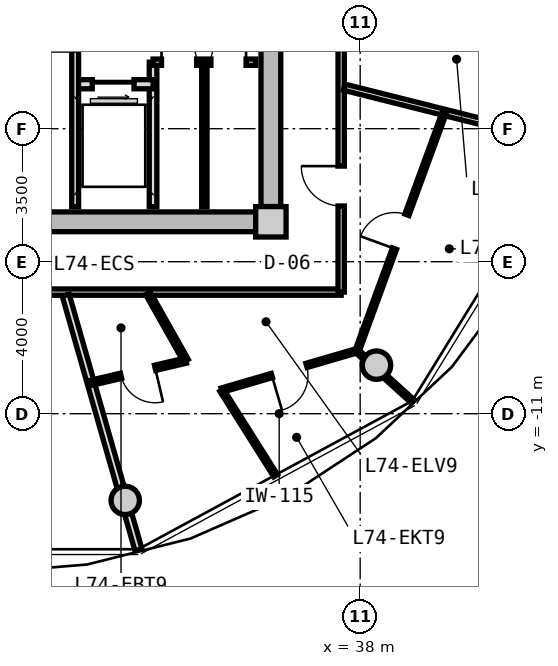
"""IFC4 building model, lengths in metres.
Left out: names, types, materials, properties, quantities, classifications, styles, units other than length and angle.
Written with IfcOpenShell. Run it as: python <this file> out.ifc"""

import sys

from ifc_helpers import new_model, si_unit, direction, frame, frame_2d, origin, origin_2d, place, context, subcontext, project, spatial, rectangle, circle, extrude, source, transform, mapped, element, fill, save


model = new_model("IFC4")
c1 = context("Model", 3, precision=1e-05, world=origin(), true_north=direction((0.0, 1.0)))
c2 = subcontext(c1, "Body", "Model", "MODEL_VIEW")
j1 = project(units=[si_unit("LENGTHUNIT", "METRE"), si_unit("PLANEANGLEUNIT", "RADIAN")], contexts=[c1])
p1 = place(None, origin())
s1 = spatial("IfcSite", under=j1, at=p1, CompositionType="ELEMENT")
p2 = place(p1, origin())
s2 = spatial("IfcBuilding", under=s1, at=p2, CompositionType="ELEMENT")
p3 = place(p2, frame((0.0, 0.0, 238.3)))
s3 = spatial("IfcBuildingStorey", under=s2, at=p3, CompositionType="ELEMENT", Elevation=238.3)
m1 = source(origin(), c2, "Body", "SweptSolid", [
    extrude(rectangle(XDim=0.8, YDim=0.8, at=origin_2d()), origin(), (0.0, 0.0, 1.0), 3.05),
])
p4 = place(p3, frame((35.65, -5.95, 0.0), z_axis=(0.0, 0.0, 1.0), x_axis=(1.0, 0.0, 0.0)))
e1 = element("IfcColumn", 1, at=p4, inside=s3, PredefinedType="COLUMN", context=c2, shape_type="MappedRepresentation", body=[
    mapped(m1, transform((0.0, 0.0, 0.0), x_axis=(1.0, 0.0, 0.0), y_axis=(0.0, 1.0, 0.0), z_axis=(0.0, 0.0, 1.0), scale=1.0)),
])
m2 = source(origin(), c2, "Body", "SweptSolid", [
    extrude(rectangle(XDim=14.5, YDim=0.52, at=frame_2d((7.25, 0.0))), origin(), (0.0, 0.0, 1.0), 2.81),
])
p5 = place(p3, frame((35.25, -5.95, 0.0), z_axis=(0.0, 0.0, 1.0), x_axis=(-1.0, 0.0, 0.0)))
e2 = element("IfcWall", 2, at=p5, inside=s3, PredefinedType="SHEAR", context=c2, shape_type="MappedRepresentation", body=[
    mapped(m2, transform((0.0, 0.0, 0.0), x_axis=(1.0, 0.0, 0.0), y_axis=(0.0, 1.0, 0.0), z_axis=(0.0, 0.0, 1.0), scale=1.0)),
])
m3 = source(origin(), c2, "Body", "SweptSolid", [
    extrude(rectangle(XDim=11.1, YDim=0.52, at=frame_2d((5.55, 0.0))), origin(), (0.0, 0.0, 1.0), 2.81),
])
p6 = place(p3, frame((35.65, 5.55, 0.0), z_axis=(0.0, 0.0, 1.0), x_axis=(0.0, -1.0, 0.0)))
e3 = element("IfcWall", 3, at=p6, inside=s3, PredefinedType="SHEAR", context=c2, shape_type="MappedRepresentation", body=[
    mapped(m3, transform((0.0, 0.0, 0.0), x_axis=(1.0, 0.0, 0.0), y_axis=(0.0, 1.0, 0.0), z_axis=(0.0, 0.0, 1.0), scale=1.0)),
])
p7 = place(p6, frame((5.65, 0.0, 0.0)))
e4 = element("IfcOpeningElement", 4, at=p7, cuts=e3, PredefinedType="OPENING", context=c2, shape_type="SweptSolid", body=[
    extrude(rectangle(XDim=1.2, YDim=2.15, at=frame_2d((0.6, 1.075))), frame((0.0, 0.27, 0.0), z_axis=(0.0, -1.0, 0.0), x_axis=(1.0, 0.0, 0.0)), (0.0, 0.0, 1.0), 0.54),
])
m4 = source(origin(), c2, "Body", "SweptSolid", [
    extrude(circle(Radius=0.375, at=origin_2d()), origin(), (0.0, 0.0, 1.0), 3.05),
])
for number, where, z_axis, x_axis in (
    (5, (31.818, -13.281, 0.0), (0.0, 0.0, 1.0), (1.0, 0.0, 0.0)),
    (6, (38.43, -9.723, 0.0), (0.0, 0.0, 1.0), (1.0, 0.0, 0.0)),
):
    element("IfcColumn", number, at=place(p3, frame(where, z_axis=z_axis, x_axis=x_axis)), inside=s3, PredefinedType="COLUMN", context=c2, shape_type="MappedRepresentation", body=[
        mapped(m4, transform((0.0, 0.0, 0.0), x_axis=(1.0, 0.0, 0.0), y_axis=(0.0, 1.0, 0.0), z_axis=(0.0, 0.0, 1.0), scale=1.0)),
    ])
m5 = source(origin(), c2, "Body", "SweptSolid", [
    extrude(rectangle(XDim=3.8, YDim=0.2, at=frame_2d((1.9, 0.0))), origin(), (0.0, 0.0, 1.0), 2.795),
])
p8 = place(p3, frame((32.55, -5.55, 0.0), z_axis=(0.0, 0.0, 1.0), x_axis=(0.0, 1.0, 0.0)))
e7 = element("IfcWall", 7, at=p8, inside=s3, PredefinedType="PARTITIONING", context=c2, shape_type="MappedRepresentation", body=[
    mapped(m5, transform((0.0, 0.0, 0.0), x_axis=(1.0, 0.0, 0.0), y_axis=(0.0, 1.0, 0.0), z_axis=(0.0, 0.0, 1.0), scale=1.0)),
])
m6 = source(origin(), c2, "Body", "SweptSolid", [
    extrude(rectangle(XDim=2.05, YDim=0.24, at=frame_2d((1.025, 0.0))), origin(), (0.0, 0.0, 1.0), 2.795),
])
p9 = place(p3, frame((30.5, -2.33, 0.0), z_axis=(0.0, 0.0, 1.0), x_axis=(1.0, 0.0, 0.0)))
e8 = element("IfcWall", 8, at=p9, inside=s3, PredefinedType="PARTITIONING", context=c2, shape_type="MappedRepresentation", body=[
    mapped(m6, transform((0.0, 0.0, 0.0), x_axis=(1.0, 0.0, 0.0), y_axis=(0.0, 1.0, 0.0), z_axis=(0.0, 0.0, 1.0), scale=1.0)),
])
p10 = place(p9, frame((0.45, 0.0, 0.0)))
e9 = element("IfcOpeningElement", 9, at=p10, cuts=e8, PredefinedType="OPENING", context=c2, shape_type="SweptSolid", body=[
    extrude(rectangle(XDim=1.1, YDim=2.2, at=frame_2d((0.55, 1.1))), frame((0.0, 0.13, 0.0), z_axis=(0.0, -1.0, 0.0), x_axis=(1.0, 0.0, 0.0)), (0.0, 0.0, 1.0), 0.26),
])
m7 = source(origin(), c2, "Body", "SweptSolid", [
    extrude(rectangle(XDim=4.2, YDim=0.18, at=frame_2d((2.1, 0.0))), origin(), (0.0, 0.0, 1.0), 2.795),
])
p11 = place(p3, frame((30.5, -5.55, 0.0), z_axis=(0.0, 0.0, 1.0), x_axis=(0.0, 1.0, 0.0)))
e10 = element("IfcWall", 10, at=p11, inside=s3, PredefinedType="PARTITIONING", context=c2, shape_type="MappedRepresentation", body=[
    mapped(m7, transform((0.0, 0.0, 0.0), x_axis=(1.0, 0.0, 0.0), y_axis=(0.0, 1.0, 0.0), z_axis=(0.0, 0.0, 1.0), scale=1.0)),
])
m8 = source(origin(), c2, "Body", "SweptSolid", [
    extrude(rectangle(XDim=2.7, YDim=0.165, at=frame_2d((1.35, 0.0))), origin(), (0.0, 0.0, 1.0), 2.795),
])
p12 = place(p3, frame((32.55, -1.75, 0.0), z_axis=(0.0, 0.0, 1.0), x_axis=(1.0, 0.0, 0.0)))
e11 = element("IfcWall", 11, at=p12, inside=s3, PredefinedType="PARTITIONING", context=c2, shape_type="MappedRepresentation", body=[
    mapped(m8, transform((0.0, 0.0, 0.0), x_axis=(1.0, 0.0, 0.0), y_axis=(0.0, 1.0, 0.0), z_axis=(0.0, 0.0, 1.0), scale=1.0)),
])
p13 = place(p12, frame((0.222, 0.0, 0.0)))
e12 = element("IfcOpeningElement", 12, at=p13, cuts=e11, PredefinedType="OPENING", context=c2, shape_type="SweptSolid", body=[
    extrude(rectangle(XDim=0.925, YDim=2.1, at=frame_2d((0.462, 1.05))), frame((0.0, 0.093, 0.0), z_axis=(0.0, -1.0, 0.0), x_axis=(1.0, 0.0, 0.0)), (0.0, 0.0, 1.0), 0.185),
])
p14 = place(p12, frame((1.522, 0.0, 0.0)))
e13 = element("IfcOpeningElement", 13, at=p14, cuts=e11, PredefinedType="OPENING", context=c2, shape_type="SweptSolid", body=[
    extrude(rectangle(XDim=0.925, YDim=2.1, at=frame_2d((0.462, 1.05))), frame((0.0, 0.093, 0.0), z_axis=(0.0, -1.0, 0.0), x_axis=(1.0, 0.0, 0.0)), (0.0, 0.0, 1.0), 0.185),
])
m9 = source(origin(), c2, "Body", "SweptSolid", [
    extrude(rectangle(XDim=3.8, YDim=0.14, at=frame_2d((1.9, 0.0))), origin(), (0.0, 0.0, 1.0), 2.795),
])
p15 = place(p3, frame((33.9, -5.55, 0.0), z_axis=(0.0, 0.0, 1.0), x_axis=(0.0, 1.0, 0.0)))
e14 = element("IfcWall", 14, at=p15, inside=s3, PredefinedType="PARTITIONING", context=c2, shape_type="MappedRepresentation", body=[
    mapped(m9, transform((0.0, 0.0, 0.0), x_axis=(1.0, 0.0, 0.0), y_axis=(0.0, 1.0, 0.0), z_axis=(0.0, 0.0, 1.0), scale=1.0)),
])
m10 = source(origin(), c2, "Body", "SweptSolid", [
    extrude(rectangle(XDim=19.0, YDim=0.165, at=frame_2d((9.5, 0.0))), origin(), (0.0, 0.0, 1.0), 2.795),
])
p16 = place(p3, frame((37.5, -7.8, 0.0), z_axis=(0.0, 0.0, 1.0), x_axis=(-1.0, 0.0, 0.0)))
e15 = element("IfcWall", 15, at=p16, inside=s3, PredefinedType="PARTITIONING", context=c2, shape_type="MappedRepresentation", body=[
    mapped(m10, transform((0.0, 0.0, 0.0), x_axis=(1.0, 0.0, 0.0), y_axis=(0.0, 1.0, 0.0), z_axis=(0.0, 0.0, 1.0), scale=1.0)),
])
p17 = place(p16, frame((12.373, 0.0, 0.0)))
e16 = element("IfcOpeningElement", 16, at=p17, cuts=e15, PredefinedType="OPENING", context=c2, shape_type="SweptSolid", body=[
    extrude(rectangle(XDim=1.25, YDim=2.2, at=frame_2d((0.625, 1.1))), frame((0.0, 0.093, 0.0), z_axis=(0.0, -1.0, 0.0), x_axis=(1.0, 0.0, 0.0)), (0.0, 0.0, 1.0), 0.185),
])
m11 = source(origin(), c2, "Body", "SweptSolid", [
    extrude(rectangle(XDim=6.88, YDim=0.165, at=frame_2d((3.44, 0.0))), origin(), (0.0, 0.0, 1.0), 2.795),
])
p18 = place(p3, frame((37.5, -0.92, 0.0), z_axis=(0.0, 0.0, 1.0), x_axis=(0.0, -1.0, 0.0)))
e17 = element("IfcWall", 17, at=p18, inside=s3, PredefinedType="PARTITIONING", context=c2, shape_type="MappedRepresentation", body=[
    mapped(m11, transform((0.0, 0.0, 0.0), x_axis=(1.0, 0.0, 0.0), y_axis=(0.0, 1.0, 0.0), z_axis=(0.0, 0.0, 1.0), scale=1.0)),
])
p19 = place(p18, frame((3.564, 0.0, 0.0)))
e18 = element("IfcOpeningElement", 18, at=p19, cuts=e17, PredefinedType="OPENING", context=c2, shape_type="SweptSolid", body=[
    extrude(rectangle(XDim=1.05, YDim=2.15, at=frame_2d((0.525, 1.075))), frame((0.0, 0.093, 0.0), z_axis=(0.0, -1.0, 0.0), x_axis=(1.0, 0.0, 0.0)), (0.0, 0.0, 1.0), 0.185),
])
m12 = source(origin(), c2, "Body", "SweptSolid", [
    extrude(rectangle(XDim=6.157, YDim=0.165, at=frame_2d((3.079, 0.0))), origin(), (0.0, 0.0, 1.0), 2.395),
])
p20 = place(p3, frame((37.58, -2.407, 0.0), z_axis=(0.0, 0.0, 1.0), x_axis=(0.969840867184, -0.243738984038, 0.0)))
e19 = element("IfcWall", 19, at=p20, inside=s3, PredefinedType="PARTITIONING", context=c2, shape_type="MappedRepresentation", body=[
    mapped(m12, transform((0.0, 0.0, 0.0), x_axis=(1.0, 0.0, 0.0), y_axis=(0.0, 1.0, 0.0), z_axis=(0.0, 0.0, 1.0), scale=1.0)),
])
m13 = source(origin(), c2, "Body", "SweptSolid", [
    extrude(rectangle(XDim=6.974, YDim=0.19, at=frame_2d((3.487, 0.0))), origin(), (0.0, 0.0, 1.0), 2.395),
])
p21 = place(p3, frame((30.251, -7.88, 0.0), z_axis=(0.0, 0.0, 1.0), x_axis=(0.274707256801, -0.961527910703, 0.0)))
e20 = element("IfcWall", 20, at=p21, inside=s3, PredefinedType="PARTITIONING", context=c2, shape_type="MappedRepresentation", body=[
    mapped(m13, transform((0.0, 0.0, 0.0), x_axis=(1.0, 0.0, 0.0), y_axis=(0.0, 1.0, 0.0), z_axis=(0.0, 0.0, 1.0), scale=1.0)),
])
m14 = source(origin(), c2, "Body", "SweptSolid", [
    extrude(rectangle(XDim=6.69, YDim=0.115, at=frame_2d((3.345, 0.0))), origin(), (0.0, 0.0, 1.0), 2.795),
])
p22 = place(p3, frame((37.917, -9.352, 0.0), z_axis=(0.0, 0.0, 1.0), x_axis=(0.343693784919, 0.939081776102, 0.0)))
e21 = element("IfcWall", 21, at=p22, inside=s3, PredefinedType="PARTITIONING", context=c2, shape_type="MappedRepresentation", body=[
    mapped(m14, transform((0.0, 0.0, 0.0), x_axis=(1.0, 0.0, 0.0), y_axis=(0.0, 1.0, 0.0), z_axis=(0.0, 0.0, 1.0), scale=1.0)),
])
p23 = place(p22, frame((2.87, 0.0, 0.0)))
e22 = element("IfcOpeningElement", 22, at=p23, cuts=e21, PredefinedType="OPENING", context=c2, shape_type="SweptSolid", body=[
    extrude(rectangle(XDim=0.95, YDim=2.1, at=frame_2d((0.475, 1.05))), frame((0.0, 0.067, 0.0), z_axis=(0.0, -1.0, 0.0), x_axis=(1.0, 0.0, 0.0)), (0.0, 0.0, 1.0), 0.135),
])
m15 = source(origin(), c2, "Body", "SweptSolid", [
    extrude(rectangle(XDim=1.977, YDim=0.115, at=frame_2d((0.989, 0.0))), origin(), (0.0, 0.0, 1.0), 2.395),
])
p24 = place(p3, frame((37.917, -9.352, 0.0), z_axis=(0.0, 0.0, 1.0), x_axis=(0.742064998629, -0.670327933037, 0.0)))
e23 = element("IfcWall", 23, at=p24, inside=s3, PredefinedType="PARTITIONING", context=c2, shape_type="MappedRepresentation", body=[
    mapped(m15, transform((0.0, 0.0, 0.0), x_axis=(1.0, 0.0, 0.0), y_axis=(0.0, 1.0, 0.0), z_axis=(0.0, 0.0, 1.0), scale=1.0)),
])
m16 = source(origin(), c2, "Body", "SweptSolid", [
    extrude(rectangle(XDim=2.035, YDim=0.14, at=frame_2d((1.018, 0.0))), origin(), (0.0, 0.0, 1.0), 2.795),
])
p25 = place(p3, frame((32.415, -7.83, 0.0), z_axis=(0.0, 0.0, 1.0), x_axis=(0.491092509169, -0.871107425888, 0.0)))
e24 = element("IfcWall", 24, at=p25, inside=s3, PredefinedType="PARTITIONING", context=c2, shape_type="MappedRepresentation", body=[
    mapped(m16, transform((0.0, 0.0, 0.0), x_axis=(1.0, 0.0, 0.0), y_axis=(0.0, 1.0, 0.0), z_axis=(0.0, 0.0, 1.0), scale=1.0)),
])
m17 = source(origin(), c2, "Body", "SweptSolid", [
    extrude(rectangle(XDim=2.586, YDim=0.14, at=frame_2d((1.293, 0.0))), origin(), (0.0, 0.0, 1.0), 2.795),
])
p26 = place(p3, frame((33.415, -9.603, 0.0), z_axis=(0.0, 0.0, 1.0), x_axis=(-0.973691298219, -0.227871138526, 0.0)))
e25 = element("IfcWall", 25, at=p26, inside=s3, PredefinedType="PARTITIONING", context=c2, shape_type="MappedRepresentation", body=[
    mapped(m17, transform((0.0, 0.0, 0.0), x_axis=(1.0, 0.0, 0.0), y_axis=(0.0, 1.0, 0.0), z_axis=(0.0, 0.0, 1.0), scale=1.0)),
])
p27 = place(p26, frame((0.833, 0.0, 0.0)))
e26 = element("IfcOpeningElement", 26, at=p27, cuts=e25, PredefinedType="OPENING", context=c2, shape_type="SweptSolid", body=[
    extrude(rectangle(XDim=0.92, YDim=2.1, at=frame_2d((0.46, 1.05))), frame((0.0, 0.08, 0.0), z_axis=(0.0, -1.0, 0.0), x_axis=(1.0, 0.0, 0.0)), (0.0, 0.0, 1.0), 0.16),
])
m18 = source(origin(), c2, "Body", "SweptSolid", [
    extrude(rectangle(XDim=2.662, YDim=0.115, at=frame_2d((1.331, 0.0))), origin(), (0.0, 0.0, 1.0), 2.795),
])
p28 = place(p3, frame((34.355, -10.38, 0.0), z_axis=(0.0, 0.0, 1.0), x_axis=(0.533547747092, -0.845769946009, 0.0)))
e27 = element("IfcWall", 27, at=p28, inside=s3, PredefinedType="PARTITIONING", context=c2, shape_type="MappedRepresentation", body=[
    mapped(m18, transform((0.0, 0.0, 0.0), x_axis=(1.0, 0.0, 0.0), y_axis=(0.0, 1.0, 0.0), z_axis=(0.0, 0.0, 1.0), scale=1.0)),
])
m19 = source(origin(), c2, "Body", "SweptSolid", [
    extrude(rectangle(XDim=3.702, YDim=0.115, at=frame_2d((1.851, 0.0))), origin(), (0.0, 0.0, 1.0), 2.795),
])
p29 = place(p3, frame((34.355, -10.38, 0.0), z_axis=(0.0, 0.0, 1.0), x_axis=(0.960044309887, 0.279848035645, 0.0)))
e28 = element("IfcWall", 28, at=p29, inside=s3, PredefinedType="PARTITIONING", context=c2, shape_type="MappedRepresentation", body=[
    mapped(m19, transform((0.0, 0.0, 0.0), x_axis=(1.0, 0.0, 0.0), y_axis=(0.0, 1.0, 0.0), z_axis=(0.0, 0.0, 1.0), scale=1.0)),
])
p30 = place(p29, frame((1.376, 0.0, 0.0)))
e29 = element("IfcOpeningElement", 29, at=p30, cuts=e28, PredefinedType="OPENING", context=c2, shape_type="SweptSolid", body=[
    extrude(rectangle(XDim=0.95, YDim=2.1, at=frame_2d((0.475, 1.05))), frame((0.0, 0.067, 0.0), z_axis=(0.0, -1.0, 0.0), x_axis=(1.0, 0.0, 0.0)), (0.0, 0.0, 1.0), 0.135),
])
m20 = source(origin(), c2, "Body", "SweptSolid", [
    extrude(rectangle(XDim=1.1, YDim=2.2, at=frame_2d((0.55, 1.1))), frame((0.0, 0.025, 0.0), z_axis=(0.0, -1.0, 0.0), x_axis=(1.0, 0.0, 0.0)), (0.0, 0.0, 1.0), 0.05),
])
p31 = place(p10, frame((1.1, 0.0, 0.0), z_axis=(0.0, 0.0, 1.0), x_axis=(-1.0, 0.0, 0.0)))
e30 = element("IfcDoor", 30, at=p31, inside=s3, OperationType="SLIDING_TO_RIGHT", PredefinedType="DOOR", context=c2, shape_type="MappedRepresentation", body=[
    mapped(m20, transform((0.0, 0.0, 0.0), x_axis=(1.0, 0.0, 0.0), y_axis=(0.0, 1.0, 0.0), z_axis=(0.0, 0.0, 1.0), scale=1.0)),
])
fill(e9, e30)
m21 = source(origin(), c2, "Body", "SweptSolid", [
    extrude(rectangle(XDim=0.925, YDim=2.1, at=frame_2d((0.462, 1.05))), frame((0.0, 0.025, 0.0), z_axis=(0.0, -1.0, 0.0), x_axis=(1.0, 0.0, 0.0)), (0.0, 0.0, 1.0), 0.05),
])
p32 = place(p13, origin())
e31 = element("IfcDoor", 31, at=p32, inside=s3, OperationType="SINGLE_SWING_LEFT", PredefinedType="DOOR", context=c2, shape_type="MappedRepresentation", body=[
    mapped(m21, transform((0.0, 0.0, 0.0), x_axis=(1.0, 0.0, 0.0), y_axis=(0.0, 1.0, 0.0), z_axis=(0.0, 0.0, 1.0), scale=1.0)),
])
fill(e12, e31)
p33 = place(p14, origin())
e32 = element("IfcDoor", 32, at=p33, inside=s3, OperationType="SINGLE_SWING_RIGHT", PredefinedType="DOOR", context=c2, shape_type="MappedRepresentation", body=[
    mapped(m21, transform((0.0, 0.0, 0.0), x_axis=(1.0, 0.0, 0.0), y_axis=(0.0, 1.0, 0.0), z_axis=(0.0, 0.0, 1.0), scale=1.0)),
])
fill(e13, e32)
m22 = source(origin(), c2, "Body", "SweptSolid", [
    extrude(rectangle(XDim=1.05, YDim=2.15, at=frame_2d((0.525, 1.075))), frame((0.0, 0.025, 0.0), z_axis=(0.0, -1.0, 0.0), x_axis=(1.0, 0.0, 0.0)), (0.0, 0.0, 1.0), 0.05),
])
p34 = place(p19, frame((1.05, 0.0, 0.0), z_axis=(0.0, 0.0, 1.0), x_axis=(-1.0, 0.0, 0.0)))
e33 = element("IfcDoor", 33, at=p34, inside=s3, OperationType="SINGLE_SWING_RIGHT", PredefinedType="DOOR", context=c2, shape_type="MappedRepresentation", body=[
    mapped(m22, transform((0.0, 0.0, 0.0), x_axis=(1.0, 0.0, 0.0), y_axis=(0.0, 1.0, 0.0), z_axis=(0.0, 0.0, 1.0), scale=1.0)),
])
fill(e18, e33)
m23 = source(origin(), c2, "Body", "SweptSolid", [
    extrude(rectangle(XDim=0.92, YDim=2.1, at=frame_2d((0.46, 1.05))), frame((0.0, 0.025, 0.0), z_axis=(0.0, -1.0, 0.0), x_axis=(1.0, 0.0, 0.0)), (0.0, 0.0, 1.0), 0.05),
])
p35 = place(p27, origin())
e34 = element("IfcDoor", 34, at=p35, inside=s3, OperationType="SINGLE_SWING_LEFT", PredefinedType="DOOR", context=c2, shape_type="MappedRepresentation", body=[
    mapped(m23, transform((0.0, 0.0, 0.0), x_axis=(1.0, 0.0, 0.0), y_axis=(0.0, 1.0, 0.0), z_axis=(0.0, 0.0, 1.0), scale=1.0)),
])
fill(e26, e34)
m24 = source(origin(), c2, "Body", "SweptSolid", [
    extrude(rectangle(XDim=0.95, YDim=2.1, at=frame_2d((0.475, 1.05))), frame((0.0, 0.025, 0.0), z_axis=(0.0, -1.0, 0.0), x_axis=(1.0, 0.0, 0.0)), (0.0, 0.0, 1.0), 0.05),
])
p36 = place(p30, frame((0.95, 0.0, 0.0), z_axis=(0.0, 0.0, 1.0), x_axis=(-1.0, 0.0, 0.0)))
e35 = element("IfcDoor", 35, at=p36, inside=s3, OperationType="SINGLE_SWING_RIGHT", PredefinedType="DOOR", context=c2, shape_type="MappedRepresentation", body=[
    mapped(m24, transform((0.0, 0.0, 0.0), x_axis=(1.0, 0.0, 0.0), y_axis=(0.0, 1.0, 0.0), z_axis=(0.0, 0.0, 1.0), scale=1.0)),
])
fill(e29, e35)
p37 = place(p23, origin())
e36 = element("IfcDoor", 36, at=p37, inside=s3, OperationType="SINGLE_SWING_LEFT", PredefinedType="DOOR", context=c2, shape_type="MappedRepresentation", body=[
    mapped(m24, transform((0.0, 0.0, 0.0), x_axis=(1.0, 0.0, 0.0), y_axis=(0.0, 1.0, 0.0), z_axis=(0.0, 0.0, 1.0), scale=1.0)),
])
fill(e22, e36)
save(model, sys.argv[1])
